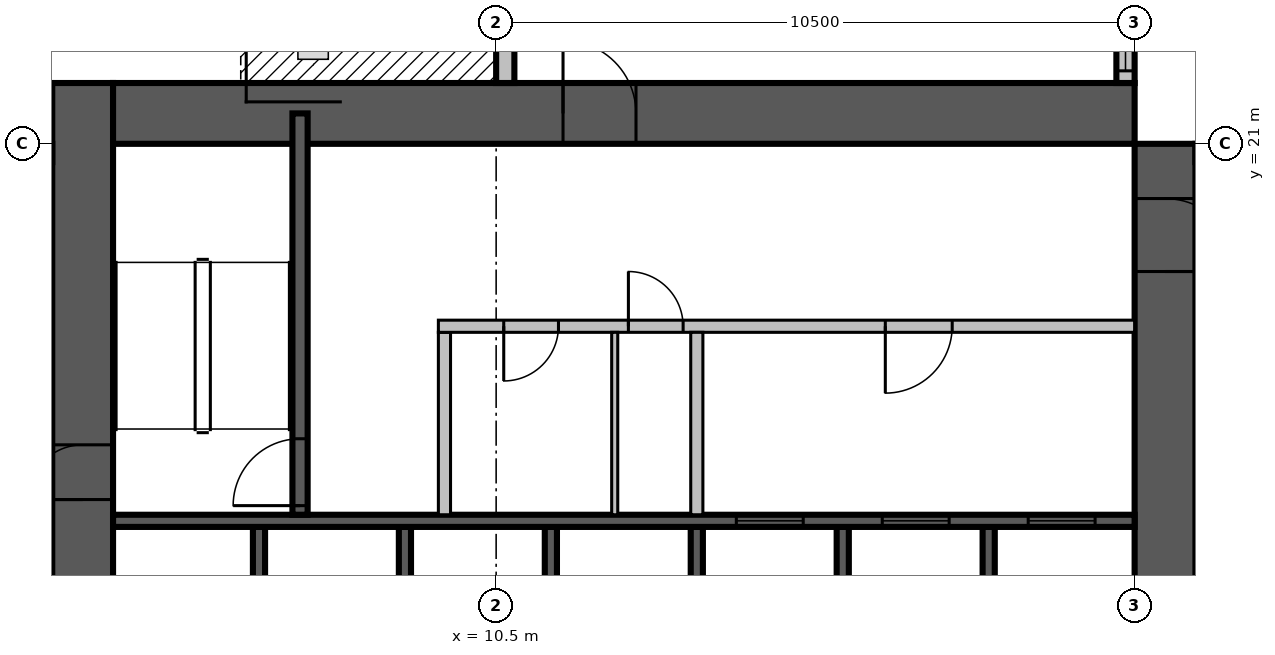
"""IFC4 building model, lengths in metres.
Left out: names, types, materials, properties, quantities, classifications, styles, units other than length and angle.
Written with IfcOpenShell. Run it as: python <this file> out.ifc"""

import sys

from ifc_helpers import new_model, si_unit, direction, frame, frame_2d, origin, place, context, subcontext, project, spatial, rectangle, extrude, source, transform, mapped, element, fill, save


model = new_model("IFC4")
c1 = context("Model", 3, precision=1e-05, world=origin(), true_north=direction((0.0, 1.0)))
c2 = subcontext(c1, "Body", "Model", "MODEL_VIEW")
j1 = project(units=[si_unit("LENGTHUNIT", "METRE"), si_unit("PLANEANGLEUNIT", "RADIAN")], contexts=[c1])
p1 = place(None, origin())
s1 = spatial("IfcSite", under=j1, at=p1, CompositionType="ELEMENT")
p2 = place(p1, origin())
s2 = spatial("IfcBuilding", under=s1, at=p2, CompositionType="ELEMENT")
p3 = place(p2, frame((0.0, 0.0, 124.5)))
s3 = spatial("IfcBuildingStorey", under=s2, at=p3, CompositionType="ELEMENT", Elevation=124.5)
m1 = source(origin(), c2, "Body", "SweptSolid", [
    extrude(rectangle(XDim=17.8, YDim=1.0, at=frame_2d((8.9, 0.0))), origin(), (0.0, 0.0, 1.0), 4.2),
])
p4 = place(p3, frame((3.7, 4.2, 0.0), z_axis=(0.0, 0.0, 1.0), x_axis=(0.0, 1.0, 0.0)))
e1 = element("IfcWall", 1, at=p4, inside=s3, PredefinedType="SHEAR", context=c2, shape_type="MappedRepresentation", body=[
    mapped(m1, transform((0.0, 0.0, 0.0), scale=1.0)),
])
m2 = source(origin(), c2, "Body", "SweptSolid", [
    extrude(rectangle(XDim=2.2, YDim=2.1, at=frame_2d((1.1, 1.05))), frame((0.0, 0.51, 0.0), z_axis=(0.0, -1.0, 0.0), x_axis=(1.0, 0.0, 0.0)), (0.0, 0.0, 1.0), 1.02),
])
p5 = place(p4, frame((4.2, 0.0, 0.0)))
e2 = element("IfcOpeningElement", 2, at=p5, cuts=e1, PredefinedType="OPENING", context=c2, shape_type="MappedRepresentation", body=[
    mapped(m2, transform((0.0, 0.0, 0.0), scale=1.0)),
])
m3 = source(origin(), c2, "Body", "SweptSolid", [
    extrude(rectangle(XDim=0.9, YDim=2.1, at=frame_2d((0.45, 1.05))), frame((0.0, 0.51, 0.0), z_axis=(0.0, -1.0, 0.0), x_axis=(1.0, 0.0, 0.0)), (0.0, 0.0, 1.0), 1.02),
])
p6 = place(p4, frame((10.95, 0.0, 0.0)))
e3 = element("IfcOpeningElement", 3, at=p6, cuts=e1, PredefinedType="OPENING", context=c2, shape_type="MappedRepresentation", body=[
    mapped(m3, transform((0.0, 0.0, 0.0), scale=1.0)),
])
m4 = source(origin(), c2, "Body", "SweptSolid", [
    extrude(rectangle(XDim=16.8, YDim=1.0, at=frame_2d((8.4, 0.0))), origin(), (0.0, 0.0, 1.0), 4.2),
])
p7 = place(p3, frame((21.5, 4.2, 0.0), z_axis=(0.0, 0.0, 1.0), x_axis=(0.0, 1.0, 0.0)))
e4 = element("IfcWall", 4, at=p7, inside=s3, PredefinedType="SHEAR", context=c2, shape_type="MappedRepresentation", body=[
    mapped(m4, transform((0.0, 0.0, 0.0), scale=1.0)),
])
p8 = place(p7, frame((4.2, 0.0, 0.0)))
e5 = element("IfcOpeningElement", 5, at=p8, cuts=e4, PredefinedType="OPENING", context=c2, shape_type="MappedRepresentation", body=[
    mapped(m2, transform((0.0, 0.0, 0.0), scale=1.0)),
])
m5 = source(origin(), c2, "Body", "SweptSolid", [
    extrude(rectangle(XDim=1.2, YDim=2.1, at=frame_2d((0.6, 1.05))), frame((0.0, 0.51, 0.0), z_axis=(0.0, -1.0, 0.0), x_axis=(1.0, 0.0, 0.0)), (0.0, 0.0, 1.0), 1.02),
])
p9 = place(p7, frame((14.7, 0.0, 0.0)))
e6 = element("IfcOpeningElement", 6, at=p9, cuts=e4, PredefinedType="OPENING", context=c2, shape_type="MappedRepresentation", body=[
    mapped(m5, transform((0.0, 0.0, 0.0), scale=1.0)),
])
p10 = place(p3, frame((4.2, 21.5, 0.0), z_axis=(0.0, 0.0, 1.0), x_axis=(1.0, 0.0, 0.0)))
e7 = element("IfcWall", 7, at=p10, inside=s3, PredefinedType="SHEAR", context=c2, shape_type="MappedRepresentation", body=[
    mapped(m4, transform((0.0, 0.0, 0.0), scale=1.0)),
])
p11 = place(p10, frame((7.4, 0.0, 0.0)))
e8 = element("IfcOpeningElement", 8, at=p11, cuts=e7, PredefinedType="OPENING", context=c2, shape_type="MappedRepresentation", body=[
    mapped(m5, transform((0.0, 0.0, 0.0), scale=1.0)),
])
m6 = source(origin(), c2, "Body", "SweptSolid", [
    extrude(rectangle(XDim=6.875, YDim=0.3, at=frame_2d((3.438, 0.0))), origin(), (0.0, 0.0, 1.0), 3.8),
])
p12 = place(p3, frame((20.85, 22.0, 0.0), z_axis=(0.0, 0.0, 1.0), x_axis=(0.0, 1.0, 0.0)))
e9 = element("IfcWall", 9, at=p12, inside=s3, PredefinedType="STANDARD", context=c2, shape_type="MappedRepresentation", body=[
    mapped(m6, transform((0.0, 0.0, 0.0), scale=1.0)),
])
m7 = source(origin(), c2, "Body", "SweptSolid", [
    extrude(rectangle(XDim=1.8, YDim=2.7, at=frame_2d((0.9, 1.35))), frame((0.0, 0.16, 0.0), z_axis=(0.0, -1.0, 0.0), x_axis=(1.0, 0.0, 0.0)), (0.0, 0.0, 1.0), 0.32),
])
p13 = place(p12, frame((0.2, 0.0, 0.6)))
e10 = element("IfcOpeningElement", 10, at=p13, cuts=e9, PredefinedType="OPENING", context=c2, shape_type="MappedRepresentation", body=[
    mapped(m7, transform((0.0, 0.0, 0.0), scale=1.0)),
])
p14 = place(p12, frame((4.537, 0.0, 0.6)))
e11 = element("IfcOpeningElement", 11, at=p14, cuts=e9, PredefinedType="OPENING", context=c2, shape_type="MappedRepresentation", body=[
    mapped(m7, transform((0.0, 0.0, 0.0), scale=1.0)),
])
p15 = place(p3, frame((10.65, 28.875, 0.0), z_axis=(0.0, 0.0, 1.0), x_axis=(0.0, -1.0, 0.0)))
e12 = element("IfcWall", 12, at=p15, inside=s3, PredefinedType="STANDARD", context=c2, shape_type="MappedRepresentation", body=[
    mapped(m6, transform((0.0, 0.0, 0.0), scale=1.0)),
])
m8 = source(origin(), c2, "Body", "SweptSolid", [
    extrude(rectangle(XDim=1.8, YDim=2.4, at=frame_2d((0.9, 1.2))), frame((0.0, 0.16, 0.0), z_axis=(0.0, -1.0, 0.0), x_axis=(1.0, 0.0, 0.0)), (0.0, 0.0, 1.0), 0.32),
])
p16 = place(p15, frame((0.1, 0.0, 0.0)))
e13 = element("IfcOpeningElement", 13, at=p16, cuts=e12, PredefinedType="OPENING", context=c2, shape_type="MappedRepresentation", body=[
    mapped(m8, transform((0.0, 0.0, 0.0), scale=1.0)),
])
p17 = place(p15, frame((4.275, 0.0, 0.0)))
e14 = element("IfcOpeningElement", 14, at=p17, cuts=e12, PredefinedType="OPENING", context=c2, shape_type="MappedRepresentation", body=[
    mapped(m8, transform((0.0, 0.0, 0.0), scale=1.0)),
])
m9 = source(origin(), c2, "Body", "SweptSolid", [
    extrude(rectangle(XDim=3.0, YDim=0.2, at=frame_2d((1.5, 0.0))), origin(), (0.0, 0.0, 1.0), 4.2),
])
for number, where, z_axis, x_axis in (
    (15, (6.6, 11.7, 0.0), (0.0, 0.0, 1.0), (0.0, 1.0, 0.0)),
    (16, (9.0, 11.7, 0.0), (0.0, 0.0, 1.0), (0.0, 1.0, 0.0)),
    (17, (11.4, 11.7, 0.0), (0.0, 0.0, 1.0), (0.0, 1.0, 0.0)),
    (18, (13.8, 11.7, 0.0), (0.0, 0.0, 1.0), (0.0, 1.0, 0.0)),
    (19, (16.2, 11.7, 0.0), (0.0, 0.0, 1.0), (0.0, 1.0, 0.0)),
    (20, (18.6, 11.7, 0.0), (0.0, 0.0, 1.0), (0.0, 1.0, 0.0)),
):
    element("IfcWall", number, at=place(p3, frame(where, z_axis=z_axis, x_axis=x_axis)), inside=s3, PredefinedType="SOLIDWALL", context=c2, shape_type="MappedRepresentation", body=[
        mapped(m9, transform((0.0, 0.0, 0.0), scale=1.0)),
    ])
m10 = source(origin(), c2, "Body", "SweptSolid", [
    extrude(rectangle(XDim=16.8, YDim=0.2, at=frame_2d((8.4, 0.0))), origin(), (0.0, 0.0, 1.0), 4.2),
])
p18 = place(p3, frame((4.2, 14.8, 0.0), z_axis=(0.0, 0.0, 1.0), x_axis=(1.0, 0.0, 0.0)))
e21 = element("IfcWall", 21, at=p18, inside=s3, PredefinedType="SOLIDWALL", context=c2, shape_type="MappedRepresentation", body=[
    mapped(m10, transform((0.0, 0.0, 0.0), scale=1.0)),
])
m11 = source(origin(), c2, "Body", "SweptSolid", [
    extrude(rectangle(XDim=1.1, YDim=2.1, at=frame_2d((0.55, 1.05))), frame((0.0, 0.11, 0.0), z_axis=(0.0, -1.0, 0.0), x_axis=(1.0, 0.0, 0.0)), (0.0, 0.0, 1.0), 0.22),
])
p19 = place(p18, frame((10.25, 0.0, 0.0)))
e22 = element("IfcOpeningElement", 22, at=p19, cuts=e21, PredefinedType="OPENING", context=c2, shape_type="MappedRepresentation", body=[
    mapped(m11, transform((0.0, 0.0, 0.0), scale=1.0)),
])
p20 = place(p18, frame((12.65, 0.0, 0.0)))
e23 = element("IfcOpeningElement", 23, at=p20, cuts=e21, PredefinedType="OPENING", context=c2, shape_type="MappedRepresentation", body=[
    mapped(m11, transform((0.0, 0.0, 0.0), scale=1.0)),
])
p21 = place(p18, frame((15.05, 0.0, 0.0)))
e24 = element("IfcOpeningElement", 24, at=p21, cuts=e21, PredefinedType="OPENING", context=c2, shape_type="MappedRepresentation", body=[
    mapped(m11, transform((0.0, 0.0, 0.0), scale=1.0)),
])
m12 = source(origin(), c2, "Body", "SweptSolid", [
    extrude(rectangle(XDim=6.6, YDim=0.25, at=frame_2d((3.3, 0.0))), origin(), (0.0, 0.0, 1.0), 3.8),
])
p22 = place(p3, frame((7.275, 14.9, 0.0), z_axis=(0.0, 0.0, 1.0), x_axis=(0.0, 1.0, 0.0)))
e25 = element("IfcWall", 25, at=p22, inside=s3, PredefinedType="SOLIDWALL", context=c2, shape_type="MappedRepresentation", body=[
    mapped(m12, transform((0.0, 0.0, 0.0), scale=1.0)),
])
m13 = source(origin(), c2, "Body", "SweptSolid", [
    extrude(rectangle(XDim=1.1, YDim=2.1, at=frame_2d((0.55, 1.05))), frame((0.0, 0.135, 0.0), z_axis=(0.0, -1.0, 0.0), x_axis=(1.0, 0.0, 0.0)), (0.0, 0.0, 1.0), 0.27),
])
p23 = place(p22, frame((0.15, 0.0, 0.0)))
e26 = element("IfcOpeningElement", 26, at=p23, cuts=e25, PredefinedType="OPENING", context=c2, shape_type="MappedRepresentation", body=[
    mapped(m13, transform((0.0, 0.0, 0.0), scale=1.0)),
])
m14 = source(origin(), c2, "Body", "SweptSolid", [
    extrude(rectangle(XDim=3.0, YDim=0.2, at=frame_2d((1.5, 0.0))), origin(), (0.0, 0.0, 1.0), 3.8),
])
p24 = place(p3, frame((9.65, 14.9, 0.0), z_axis=(0.0, 0.0, 1.0), x_axis=(0.0, 1.0, 0.0)))
e27 = element("IfcWall", 27, at=p24, inside=s3, PredefinedType="PARTITIONING", context=c2, shape_type="MappedRepresentation", body=[
    mapped(m14, transform((0.0, 0.0, 0.0), scale=1.0)),
])
m15 = source(origin(), c2, "Body", "SweptSolid", [
    extrude(rectangle(XDim=11.45, YDim=0.2, at=frame_2d((5.725, 0.0))), origin(), (0.0, 0.0, 1.0), 3.8),
])
p25 = place(p3, frame((9.55, 18.0, 0.0), z_axis=(0.0, 0.0, 1.0), x_axis=(1.0, 0.0, 0.0)))
e28 = element("IfcWall", 28, at=p25, inside=s3, PredefinedType="PARTITIONING", context=c2, shape_type="MappedRepresentation", body=[
    mapped(m15, transform((0.0, 0.0, 0.0), scale=1.0)),
])
m16 = source(origin(), c2, "Body", "SweptSolid", [
    extrude(rectangle(XDim=0.9, YDim=2.1, at=frame_2d((0.45, 1.05))), frame((0.0, 0.11, 0.0), z_axis=(0.0, -1.0, 0.0), x_axis=(1.0, 0.0, 0.0)), (0.0, 0.0, 1.0), 0.22),
])
p26 = place(p25, frame((1.075, 0.0, 0.0)))
e29 = element("IfcOpeningElement", 29, at=p26, cuts=e28, PredefinedType="OPENING", context=c2, shape_type="MappedRepresentation", body=[
    mapped(m16, transform((0.0, 0.0, 0.0), scale=1.0)),
])
p27 = place(p25, frame((3.125, 0.0, 0.0)))
e30 = element("IfcOpeningElement", 30, at=p27, cuts=e28, PredefinedType="OPENING", context=c2, shape_type="MappedRepresentation", body=[
    mapped(m16, transform((0.0, 0.0, 0.0), scale=1.0)),
])
p28 = place(p25, frame((7.35, 0.0, 0.0)))
e31 = element("IfcOpeningElement", 31, at=p28, cuts=e28, PredefinedType="OPENING", context=c2, shape_type="MappedRepresentation", body=[
    mapped(m11, transform((0.0, 0.0, 0.0), scale=1.0)),
])
p29 = place(p3, frame((13.8, 14.9, 0.0), z_axis=(0.0, 0.0, 1.0), x_axis=(0.0, 1.0, 0.0)))
e32 = element("IfcWall", 32, at=p29, inside=s3, PredefinedType="PARTITIONING", context=c2, shape_type="MappedRepresentation", body=[
    mapped(m14, transform((0.0, 0.0, 0.0), scale=1.0)),
])
m17 = source(origin(), c2, "Body", "SweptSolid", [
    extrude(rectangle(XDim=3.0, YDim=0.1, at=frame_2d((1.5, 0.0))), origin(), (0.0, 0.0, 1.0), 3.8),
])
p30 = place(p3, frame((12.45, 14.9, 0.0), z_axis=(0.0, 0.0, 1.0), x_axis=(0.0, 1.0, 0.0)))
e33 = element("IfcWall", 33, at=p30, inside=s3, PredefinedType="PARTITIONING", context=c2, shape_type="MappedRepresentation", body=[
    mapped(m17, transform((0.0, 0.0, 0.0), scale=1.0)),
])
m18 = source(origin(), c2, "Body", "SweptSolid", [
    extrude(rectangle(XDim=1.8, YDim=2.7, at=frame_2d((0.9, 1.35))), frame((0.0, 0.03, 0.0), z_axis=(0.0, -1.0, 0.0), x_axis=(1.0, 0.0, 0.0)), (0.0, 0.0, 1.0), 0.06),
])
p31 = place(p13, origin())
e34 = element("IfcWindow", 34, at=p31, inside=s3, PartitioningType="SINGLE_PANEL", PredefinedType="WINDOW", context=c2, shape_type="MappedRepresentation", body=[
    mapped(m18, transform((0.0, 0.0, 0.0), scale=1.0)),
])
fill(e10, e34)
m19 = source(origin(), c2, "Body", "SweptSolid", [
    extrude(rectangle(XDim=1.1, YDim=2.1, at=frame_2d((0.55, 1.05))), frame((0.0, 0.025, 0.0), z_axis=(0.0, -1.0, 0.0), x_axis=(1.0, 0.0, 0.0)), (0.0, 0.0, 1.0), 0.05),
])
p32 = place(p19, origin())
e35 = element("IfcDoor", 35, at=p32, inside=s3, OperationType="SLIDING_TO_LEFT", PredefinedType="DOOR", context=c2, shape_type="MappedRepresentation", body=[
    mapped(m19, transform((0.0, 0.0, 0.0), scale=1.0)),
])
fill(e22, e35)
p33 = place(p20, origin())
e36 = element("IfcDoor", 36, at=p33, inside=s3, OperationType="SLIDING_TO_LEFT", PredefinedType="DOOR", context=c2, shape_type="MappedRepresentation", body=[
    mapped(m19, transform((0.0, 0.0, 0.0), scale=1.0)),
])
fill(e23, e36)
p34 = place(p21, origin())
e37 = element("IfcDoor", 37, at=p34, inside=s3, OperationType="SLIDING_TO_LEFT", PredefinedType="DOOR", context=c2, shape_type="MappedRepresentation", body=[
    mapped(m19, transform((0.0, 0.0, 0.0), scale=1.0)),
])
fill(e24, e37)
p35 = place(p23, origin())
e38 = element("IfcDoor", 38, at=p35, inside=s3, OperationType="SINGLE_SWING_LEFT", PredefinedType="DOOR", context=c2, shape_type="MappedRepresentation", body=[
    mapped(m19, transform((0.0, 0.0, 0.0), scale=1.0)),
])
fill(e26, e38)
m20 = source(origin(), c2, "Body", "SweptSolid", [
    extrude(rectangle(XDim=0.9, YDim=2.1, at=frame_2d((0.45, 1.05))), frame((0.0, 0.025, 0.0), z_axis=(0.0, -1.0, 0.0), x_axis=(1.0, 0.0, 0.0)), (0.0, 0.0, 1.0), 0.05),
])
p36 = place(p26, origin())
e39 = element("IfcDoor", 39, at=p36, inside=s3, OperationType="SINGLE_SWING_RIGHT", PredefinedType="DOOR", context=c2, shape_type="MappedRepresentation", body=[
    mapped(m20, transform((0.0, 0.0, 0.0), scale=1.0)),
])
fill(e29, e39)
p37 = place(p27, origin())
e40 = element("IfcDoor", 40, at=p37, inside=s3, OperationType="SINGLE_SWING_LEFT", PredefinedType="DOOR", context=c2, shape_type="MappedRepresentation", body=[
    mapped(m20, transform((0.0, 0.0, 0.0), scale=1.0)),
])
fill(e30, e40)
p38 = place(p28, origin())
e41 = element("IfcDoor", 41, at=p38, inside=s3, OperationType="SINGLE_SWING_RIGHT", PredefinedType="DOOR", context=c2, shape_type="MappedRepresentation", body=[
    mapped(m19, transform((0.0, 0.0, 0.0), scale=1.0)),
])
fill(e31, e41)
m21 = source(origin(), c2, "Body", "SweptSolid", [
    extrude(rectangle(XDim=1.2, YDim=2.1, at=frame_2d((0.6, 1.05))), frame((0.0, 0.025, 0.0), z_axis=(0.0, -1.0, 0.0), x_axis=(1.0, 0.0, 0.0)), (0.0, 0.0, 1.0), 0.05),
])
p39 = place(p11, origin())
e42 = element("IfcDoor", 42, at=p39, inside=s3, OperationType="SINGLE_SWING_LEFT", PredefinedType="DOOR", context=c2, shape_type="MappedRepresentation", body=[
    mapped(m21, transform((0.0, 0.0, 0.0), scale=1.0)),
])
fill(e8, e42)
p40 = place(p9, origin())
e43 = element("IfcDoor", 43, at=p40, inside=s3, OperationType="SINGLE_SWING_RIGHT", PredefinedType="DOOR", context=c2, shape_type="MappedRepresentation", body=[
    mapped(m21, transform((0.0, 0.0, 0.0), scale=1.0)),
])
fill(e6, e43)
p41 = place(p6, origin())
e44 = element("IfcDoor", 44, at=p41, inside=s3, OperationType="SINGLE_SWING_LEFT", PredefinedType="DOOR", context=c2, shape_type="MappedRepresentation", body=[
    mapped(m20, transform((0.0, 0.0, 0.0), scale=1.0)),
])
fill(e3, e44)
save(model, sys.argv[1])
